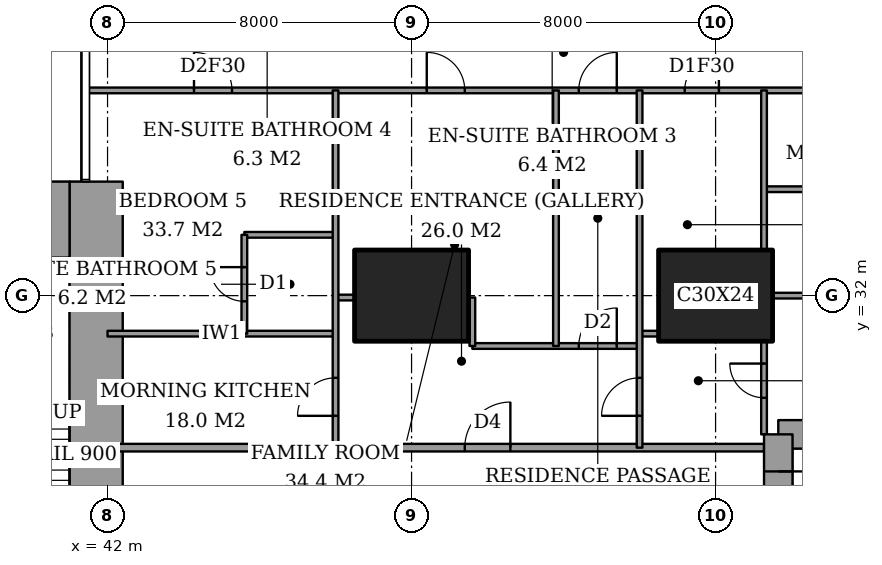
"""IFC4 building model, lengths in metres.
Left out: names, types, materials, properties, quantities, classifications, styles, units other than length and angle.
Written with IfcOpenShell. Run it as: python <this file> out.ifc"""

import sys

from ifc_helpers import new_model, si_unit, direction, frame, frame_2d, origin, origin_2d, place, context, subcontext, project, spatial, rectangle, extrude, element, fill, save


model = new_model("IFC4")
c1 = context("Model", 3, precision=1e-05, world=origin(), true_north=direction((0.0, 1.0)))
c2 = subcontext(c1, "Body", "Model", "MODEL_VIEW")
j1 = project(units=[si_unit("LENGTHUNIT", "METRE"), si_unit("PLANEANGLEUNIT", "RADIAN")], contexts=[c1])
p1 = place(None, origin())
s1 = spatial("IfcSite", under=j1, at=p1, CompositionType="ELEMENT")
p2 = place(p1, origin())
s2 = spatial("IfcBuilding", under=s1, at=p2, CompositionType="ELEMENT")
p3 = place(p2, frame((0.0, 0.0, 259.2)))
s3 = spatial("IfcBuildingStorey", under=s2, at=p3, CompositionType="ELEMENT", Elevation=259.2)
for number, where, z_axis, x_axis in (
    (1, (50.0, 32.0, 0.0), (0.0, 0.0, 1.0), (1.0, 0.0, 0.0)),
    (2, (58.0, 32.0, 0.0), (0.0, 0.0, 1.0), (1.0, 0.0, 0.0)),
):
    element("IfcColumn", number, at=place(p3, frame(where, z_axis=z_axis, x_axis=x_axis)), inside=s3, PredefinedType="COLUMN", context=c2, shape_type="SweptSolid", body=[
        extrude(rectangle(XDim=3.0, YDim=2.4, at=origin_2d()), origin(), (0.0, 0.0, 1.0), 3.6),
    ])
p4 = place(p3, frame((37.85, 34.0, 0.0), z_axis=(0.0, 0.0, 1.0), x_axis=(1.0, 0.0, 0.0)))
e3 = element("IfcWall", 3, at=p4, inside=s3, PredefinedType="SHEAR", context=c2, shape_type="SweptSolid", body=[
    extrude(rectangle(XDim=3.15, YDim=2.0, at=frame_2d((1.575, 0.0))), origin(), (0.0, 0.0, 1.0), 3.6),
])
p5 = place(p3, frame((41.7, 24.85, 0.0), z_axis=(0.0, 0.0, 1.0), x_axis=(0.0, 1.0, 0.0)))
e4 = element("IfcWall", 4, at=p5, inside=s3, PredefinedType="SHEAR", context=c2, shape_type="SweptSolid", body=[
    extrude(rectangle(XDim=10.15, YDim=1.4, at=frame_2d((5.075, 0.0))), origin(), (0.0, 0.0, 1.0), 3.6),
])
p6 = place(p3, frame((64.1, 28.35, 0.0), z_axis=(0.0, 0.0, 1.0), x_axis=(-1.0, 0.0, 0.0)))
e5 = element("IfcWall", 5, at=p6, inside=s3, PredefinedType="SHEAR", context=c2, shape_type="SweptSolid", body=[
    extrude(rectangle(XDim=4.45, YDim=0.75, at=frame_2d((2.225, 0.0))), origin(), (0.0, 0.0, 1.0), 3.6),
])
p7 = place(p3, frame((59.65, 28.35, 0.0), z_axis=(0.0, 0.0, 1.0), x_axis=(0.0, -1.0, 0.0)))
e6 = element("IfcWall", 6, at=p7, inside=s3, PredefinedType="SHEAR", context=c2, shape_type="SweptSolid", body=[
    extrude(rectangle(XDim=8.7, YDim=0.75, at=frame_2d((4.35, 0.0))), origin(), (0.0, 0.0, 1.0), 3.6),
])
p8 = place(p7, frame((0.975, 0.0, 0.0)))
e7 = element("IfcOpeningElement", 7, at=p8, cuts=e6, PredefinedType="OPENING", context=c2, shape_type="SweptSolid", body=[
    extrude(rectangle(XDim=1.0, YDim=2.1, at=frame_2d((0.5, 1.05))), frame((0.0, 0.385, 0.0), z_axis=(0.0, -1.0, 0.0), x_axis=(1.0, 0.0, 0.0)), (0.0, 0.0, 1.0), 0.77),
])
p9 = place(p3, frame((42.0, 28.0, 0.0), z_axis=(0.0, 0.0, 1.0), x_axis=(1.0, 0.0, 0.0)))
e8 = element("IfcWall", 8, at=p9, inside=s3, PredefinedType="PARTITIONING", context=c2, shape_type="SweptSolid", body=[
    extrude(rectangle(XDim=17.275, YDim=0.2, at=frame_2d((8.637, 0.0))), origin(), (0.0, 0.0, 1.0), 3.35),
])
p10 = place(p9, frame((9.4, 0.0, 0.0)))
e9 = element("IfcOpeningElement", 9, at=p10, cuts=e8, PredefinedType="OPENING", context=c2, shape_type="SweptSolid", body=[
    extrude(rectangle(XDim=1.2, YDim=2.4, at=frame_2d((0.6, 1.2))), frame((0.0, 0.11, 0.0), z_axis=(0.0, -1.0, 0.0), x_axis=(1.0, 0.0, 0.0)), (0.0, 0.0, 1.0), 0.22),
])
p11 = place(p3, frame((51.6, 30.675, 0.0), z_axis=(0.0, 0.0, 1.0), x_axis=(1.0, 0.0, 0.0)))
e10 = element("IfcWall", 10, at=p11, inside=s3, PredefinedType="PARTITIONING", context=c2, shape_type="SweptSolid", body=[
    extrude(rectangle(XDim=4.4, YDim=0.15, at=frame_2d((2.2, 0.0))), origin(), (0.0, 0.0, 1.0), 3.35),
])
p12 = place(p11, frame((2.8, 0.0, 0.0)))
e11 = element("IfcOpeningElement", 11, at=p12, cuts=e10, PredefinedType="OPENING", context=c2, shape_type="SweptSolid", body=[
    extrude(rectangle(XDim=1.0, YDim=2.1, at=frame_2d((0.5, 1.05))), frame((0.0, 0.085, 0.0), z_axis=(0.0, -1.0, 0.0), x_axis=(1.0, 0.0, 0.0)), (0.0, 0.0, 1.0), 0.17),
])
p13 = place(p3, frame((42.0, 31.0, 0.0), z_axis=(0.0, 0.0, 1.0), x_axis=(1.0, 0.0, 0.0)))
e12 = element("IfcWall", 12, at=p13, inside=s3, PredefinedType="PARTITIONING", context=c2, shape_type="SweptSolid", body=[
    extrude(rectangle(XDim=6.0, YDim=0.15, at=frame_2d((3.0, 0.0))), origin(), (0.0, 0.0, 1.0), 3.35),
])
p14 = place(p3, frame((56.0, 31.0, 0.0), z_axis=(0.0, 0.0, 1.0), x_axis=(1.0, 0.0, 0.0)))
e13 = element("IfcWall", 13, at=p14, inside=s3, PredefinedType="PARTITIONING", context=c2, shape_type="SweptSolid", body=[
    extrude(rectangle(XDim=0.5, YDim=0.15, at=frame_2d((0.25, 0.0))), origin(), (0.0, 0.0, 1.0), 3.35),
])
p15 = place(p3, frame((48.0, 31.95, 0.0), z_axis=(0.0, 0.0, 1.0), x_axis=(1.0, 0.0, 0.0)))
e14 = element("IfcWall", 14, at=p15, inside=s3, PredefinedType="PARTITIONING", context=c2, shape_type="SweptSolid", body=[
    extrude(rectangle(XDim=0.5, YDim=0.15, at=frame_2d((0.25, 0.0))), origin(), (0.0, 0.0, 1.0), 2.634),
])
p16 = place(p3, frame((59.5, 32.0, 0.0), z_axis=(0.0, 0.0, 1.0), x_axis=(1.0, 0.0, 0.0)))
e15 = element("IfcWall", 15, at=p16, inside=s3, PredefinedType="PARTITIONING", context=c2, shape_type="SweptSolid", body=[
    extrude(rectangle(XDim=5.35, YDim=0.15, at=frame_2d((2.675, 0.0))), origin(), (0.0, 0.0, 1.0), 2.634),
])
p17 = place(p3, frame((45.6, 33.6, 0.0), z_axis=(0.0, 0.0, 1.0), x_axis=(1.0, 0.0, 0.0)))
e16 = element("IfcWall", 16, at=p17, inside=s3, PredefinedType="PARTITIONING", context=c2, shape_type="SweptSolid", body=[
    extrude(rectangle(XDim=2.4, YDim=0.15, at=frame_2d((1.2, 0.0))), origin(), (0.0, 0.0, 1.0), 3.35),
])
p18 = place(p3, frame((59.275, 34.8, 0.0), z_axis=(0.0, 0.0, 1.0), x_axis=(1.0, 0.0, 0.0)))
e17 = element("IfcWall", 17, at=p18, inside=s3, PredefinedType="PARTITIONING", context=c2, shape_type="SweptSolid", body=[
    extrude(rectangle(XDim=2.6, YDim=0.15, at=frame_2d((1.3, 0.0))), origin(), (0.0, 0.0, 1.0), 3.35),
])
p19 = place(p3, frame((41.439, 37.4, 0.0), z_axis=(0.0, 0.0, 1.0), x_axis=(1.0, 0.0, 0.0)))
e18 = element("IfcWall", 18, at=p19, inside=s3, PredefinedType="PARTITIONING", context=c2, shape_type="SweptSolid", body=[
    extrude(rectangle(XDim=25.011, YDim=0.15, at=frame_2d((12.505, 0.0))), origin(), (0.0, 0.0, 1.0), 3.35),
])
p20 = place(p19, frame((12.961, 0.0, 0.0)))
e19 = element("IfcOpeningElement", 19, at=p20, cuts=e18, PredefinedType="OPENING", context=c2, shape_type="SweptSolid", body=[
    extrude(rectangle(XDim=1.0, YDim=2.1, at=frame_2d((0.5, 1.05))), frame((0.0, 0.085, 0.0), z_axis=(0.0, -1.0, 0.0), x_axis=(1.0, 0.0, 0.0)), (0.0, 0.0, 1.0), 0.17),
])
p21 = place(p19, frame((20.924, 0.0, 0.0)))
e20 = element("IfcOpeningElement", 20, at=p21, cuts=e18, PredefinedType="OPENING", context=c2, shape_type="SweptSolid", body=[
    extrude(rectangle(XDim=1.0, YDim=2.1, at=frame_2d((0.5, 1.05))), frame((0.0, 0.085, 0.0), z_axis=(0.0, -1.0, 0.0), x_axis=(1.0, 0.0, 0.0)), (0.0, 0.0, 1.0), 0.17),
])
p22 = place(p19, frame((15.749, 0.0, 0.0)))
e21 = element("IfcOpeningElement", 21, at=p22, cuts=e18, PredefinedType="OPENING", context=c2, shape_type="SweptSolid", body=[
    extrude(rectangle(XDim=0.9, YDim=2.1, at=frame_2d((0.45, 1.05))), frame((0.0, 0.085, 0.0), z_axis=(0.0, -1.0, 0.0), x_axis=(1.0, 0.0, 0.0)), (0.0, 0.0, 1.0), 0.17),
])
p23 = place(p19, frame((8.961, 0.0, 0.0)))
e22 = element("IfcOpeningElement", 22, at=p23, cuts=e18, PredefinedType="OPENING", context=c2, shape_type="SweptSolid", body=[
    extrude(rectangle(XDim=1.0, YDim=2.1, at=frame_2d((0.5, 1.05))), frame((0.0, 0.085, 0.0), z_axis=(0.0, -1.0, 0.0), x_axis=(1.0, 0.0, 0.0)), (0.0, 0.0, 1.0), 0.17),
])
p24 = place(p19, frame((2.836, 0.0, 0.0)))
e23 = element("IfcOpeningElement", 23, at=p24, cuts=e18, PredefinedType="OPENING", context=c2, shape_type="SweptSolid", body=[
    extrude(rectangle(XDim=1.0, YDim=2.1, at=frame_2d((0.5, 1.05))), frame((0.0, 0.085, 0.0), z_axis=(0.0, -1.0, 0.0), x_axis=(1.0, 0.0, 0.0)), (0.0, 0.0, 1.0), 0.17),
])
p25 = place(p3, frame((45.6, 31.0, 0.0), z_axis=(0.0, 0.0, 1.0), x_axis=(0.0, 1.0, 0.0)))
e24 = element("IfcWall", 24, at=p25, inside=s3, PredefinedType="PARTITIONING", context=c2, shape_type="SweptSolid", body=[
    extrude(rectangle(XDim=2.6, YDim=0.15, at=frame_2d((1.3, 0.0))), origin(), (0.0, 0.0, 1.0), 3.35),
])
p26 = place(p25, frame((0.85, 0.0, 0.0)))
e25 = element("IfcOpeningElement", 25, at=p26, cuts=e24, PredefinedType="OPENING", context=c2, shape_type="SweptSolid", body=[
    extrude(rectangle(XDim=0.9, YDim=2.1, at=frame_2d((0.45, 1.05))), frame((0.0, 0.085, 0.0), z_axis=(0.0, -1.0, 0.0), x_axis=(1.0, 0.0, 0.0)), (0.0, 0.0, 1.0), 0.17),
])
p27 = place(p3, frame((48.0, 28.0, 0.0), z_axis=(0.0, 0.0, 1.0), x_axis=(0.0, 1.0, 0.0)))
e26 = element("IfcWall", 26, at=p27, inside=s3, PredefinedType="PARTITIONING", context=c2, shape_type="SweptSolid", body=[
    extrude(rectangle(XDim=9.4, YDim=0.15, at=frame_2d((4.7, 0.0))), origin(), (0.0, 0.0, 1.0), 3.35),
])
p28 = place(p27, frame((0.837, 0.0, 0.0)))
e27 = element("IfcOpeningElement", 27, at=p28, cuts=e26, PredefinedType="OPENING", context=c2, shape_type="SweptSolid", body=[
    extrude(rectangle(XDim=1.0, YDim=2.1, at=frame_2d((0.5, 1.05))), frame((0.0, 0.085, 0.0), z_axis=(0.0, -1.0, 0.0), x_axis=(1.0, 0.0, 0.0)), (0.0, 0.0, 1.0), 0.17),
])
p29 = place(p3, frame((51.6, 30.675, 0.0), z_axis=(0.0, 0.0, 1.0), x_axis=(0.0, 1.0, 0.0)))
e28 = element("IfcWall", 28, at=p29, inside=s3, PredefinedType="PARTITIONING", context=c2, shape_type="SweptSolid", body=[
    extrude(rectangle(XDim=1.275, YDim=0.15, at=frame_2d((0.637, 0.0))), origin(), (0.0, 0.0, 1.0), 3.35),
])
p30 = place(p3, frame((53.8, 30.675, 0.0), z_axis=(0.0, 0.0, 1.0), x_axis=(0.0, 1.0, 0.0)))
e29 = element("IfcWall", 29, at=p30, inside=s3, PredefinedType="PARTITIONING", context=c2, shape_type="SweptSolid", body=[
    extrude(rectangle(XDim=6.725, YDim=0.15, at=frame_2d((3.362, 0.0))), origin(), (0.0, 0.0, 1.0), 3.35),
])
p31 = place(p3, frame((56.0, 28.0, 0.0), z_axis=(0.0, 0.0, 1.0), x_axis=(0.0, 1.0, 0.0)))
e30 = element("IfcWall", 30, at=p31, inside=s3, PredefinedType="PARTITIONING", context=c2, shape_type="SweptSolid", body=[
    extrude(rectangle(XDim=9.4, YDim=0.15, at=frame_2d((4.7, 0.0))), origin(), (0.0, 0.0, 1.0), 3.35),
])
p32 = place(p31, frame((0.837, 0.0, 0.0)))
e31 = element("IfcOpeningElement", 31, at=p32, cuts=e30, PredefinedType="OPENING", context=c2, shape_type="SweptSolid", body=[
    extrude(rectangle(XDim=1.0, YDim=2.1, at=frame_2d((0.5, 1.05))), frame((0.0, 0.085, 0.0), z_axis=(0.0, -1.0, 0.0), x_axis=(1.0, 0.0, 0.0)), (0.0, 0.0, 1.0), 0.17),
])
p33 = place(p3, frame((59.275, 28.35, 0.0), z_axis=(0.0, 0.0, 1.0), x_axis=(0.0, 1.0, 0.0)))
e32 = element("IfcWall", 32, at=p33, inside=s3, PredefinedType="PARTITIONING", context=c2, shape_type="SweptSolid", body=[
    extrude(rectangle(XDim=2.45, YDim=0.15, at=frame_2d((1.225, 0.0))), origin(), (0.0, 0.0, 1.0), 3.35),
])
p34 = place(p33, frame((0.962, 0.0, 0.0)))
e33 = element("IfcOpeningElement", 33, at=p34, cuts=e32, PredefinedType="OPENING", context=c2, shape_type="SweptSolid", body=[
    extrude(rectangle(XDim=0.9, YDim=2.1, at=frame_2d((0.45, 1.05))), frame((0.0, 0.085, 0.0), z_axis=(0.0, -1.0, 0.0), x_axis=(1.0, 0.0, 0.0)), (0.0, 0.0, 1.0), 0.17),
])
p35 = place(p3, frame((59.275, 33.2, 0.0), z_axis=(0.0, 0.0, 1.0), x_axis=(0.0, 1.0, 0.0)))
e34 = element("IfcWall", 34, at=p35, inside=s3, PredefinedType="PARTITIONING", context=c2, shape_type="SweptSolid", body=[
    extrude(rectangle(XDim=4.2, YDim=0.15, at=frame_2d((2.1, 0.0))), origin(), (0.0, 0.0, 1.0), 3.35),
])
p36 = place(p20, origin())
e35 = element("IfcDoor", 35, at=p36, inside=s3, OperationType="SINGLE_SWING_LEFT", PredefinedType="DOOR", context=c2, shape_type="SweptSolid", body=[
    extrude(rectangle(XDim=1.0, YDim=2.1, at=frame_2d((0.5, 1.05))), frame((0.0, 0.025, 0.0), z_axis=(0.0, -1.0, 0.0), x_axis=(1.0, 0.0, 0.0)), (0.0, 0.0, 1.0), 0.05),
])
fill(e19, e35)
p37 = place(p34, origin())
e36 = element("IfcDoor", 36, at=p37, inside=s3, OperationType="SINGLE_SWING_LEFT", PredefinedType="DOOR", context=c2, shape_type="SweptSolid", body=[
    extrude(rectangle(XDim=0.9, YDim=2.1, at=frame_2d((0.45, 1.05))), frame((0.0, 0.025, 0.0), z_axis=(0.0, -1.0, 0.0), x_axis=(1.0, 0.0, 0.0)), (0.0, 0.0, 1.0), 0.05),
])
fill(e33, e36)
p38 = place(p22, origin())
e37 = element("IfcDoor", 37, at=p38, inside=s3, OperationType="SINGLE_SWING_LEFT", PredefinedType="DOOR", context=c2, shape_type="SweptSolid", body=[
    extrude(rectangle(XDim=0.9, YDim=2.1, at=frame_2d((0.45, 1.05))), frame((0.0, 0.025, 0.0), z_axis=(0.0, -1.0, 0.0), x_axis=(1.0, 0.0, 0.0)), (0.0, 0.0, 1.0), 0.05),
])
fill(e21, e37)
p39 = place(p32, origin())
e38 = element("IfcDoor", 38, at=p39, inside=s3, OperationType="SINGLE_SWING_RIGHT", PredefinedType="DOOR", context=c2, shape_type="SweptSolid", body=[
    extrude(rectangle(XDim=1.0, YDim=2.1, at=frame_2d((0.5, 1.05))), frame((0.0, 0.025, 0.0), z_axis=(0.0, -1.0, 0.0), x_axis=(1.0, 0.0, 0.0)), (0.0, 0.0, 1.0), 0.05),
])
fill(e31, e38)
p40 = place(p10, origin())
e39 = element("IfcDoor", 39, at=p40, inside=s3, OperationType="SINGLE_SWING_LEFT", PredefinedType="DOOR", context=c2, shape_type="SweptSolid", body=[
    extrude(rectangle(XDim=1.2, YDim=2.4, at=frame_2d((0.6, 1.2))), frame((0.0, 0.025, 0.0), z_axis=(0.0, -1.0, 0.0), x_axis=(1.0, 0.0, 0.0)), (0.0, 0.0, 1.0), 0.05),
])
fill(e9, e39)
p41 = place(p12, origin())
e40 = element("IfcDoor", 40, at=p41, inside=s3, OperationType="SINGLE_SWING_LEFT", PredefinedType="DOOR", context=c2, shape_type="SweptSolid", body=[
    extrude(rectangle(XDim=1.0, YDim=2.1, at=frame_2d((0.5, 1.05))), frame((0.0, 0.025, 0.0), z_axis=(0.0, -1.0, 0.0), x_axis=(1.0, 0.0, 0.0)), (0.0, 0.0, 1.0), 0.05),
])
fill(e11, e40)
p42 = place(p23, origin())
e41 = element("IfcDoor", 41, at=p42, inside=s3, OperationType="SINGLE_SWING_RIGHT", PredefinedType="DOOR", context=c2, shape_type="SweptSolid", body=[
    extrude(rectangle(XDim=1.0, YDim=2.1, at=frame_2d((0.5, 1.05))), frame((0.0, 0.025, 0.0), z_axis=(0.0, -1.0, 0.0), x_axis=(1.0, 0.0, 0.0)), (0.0, 0.0, 1.0), 0.05),
])
fill(e22, e41)
p43 = place(p26, origin())
e42 = element("IfcDoor", 42, at=p43, inside=s3, OperationType="SINGLE_SWING_LEFT", PredefinedType="DOOR", context=c2, shape_type="SweptSolid", body=[
    extrude(rectangle(XDim=0.9, YDim=2.1, at=frame_2d((0.45, 1.05))), frame((0.0, 0.025, 0.0), z_axis=(0.0, -1.0, 0.0), x_axis=(1.0, 0.0, 0.0)), (0.0, 0.0, 1.0), 0.05),
])
fill(e25, e42)
p44 = place(p24, origin())
e43 = element("IfcDoor", 43, at=p44, inside=s3, OperationType="SINGLE_SWING_RIGHT", PredefinedType="DOOR", context=c2, shape_type="SweptSolid", body=[
    extrude(rectangle(XDim=1.0, YDim=2.1, at=frame_2d((0.5, 1.05))), frame((0.0, 0.025, 0.0), z_axis=(0.0, -1.0, 0.0), x_axis=(1.0, 0.0, 0.0)), (0.0, 0.0, 1.0), 0.05),
])
fill(e23, e43)
p45 = place(p28, origin())
e44 = element("IfcDoor", 44, at=p45, inside=s3, OperationType="SINGLE_SWING_RIGHT", PredefinedType="DOOR", context=c2, shape_type="SweptSolid", body=[
    extrude(rectangle(XDim=1.0, YDim=2.1, at=frame_2d((0.5, 1.05))), frame((0.0, 0.025, 0.0), z_axis=(0.0, -1.0, 0.0), x_axis=(1.0, 0.0, 0.0)), (0.0, 0.0, 1.0), 0.05),
])
fill(e27, e44)
p46 = place(p8, origin())
e45 = element("IfcDoor", 45, at=p46, inside=s3, OperationType="SINGLE_SWING_RIGHT", PredefinedType="DOOR", context=c2, shape_type="SweptSolid", body=[
    extrude(rectangle(XDim=1.0, YDim=2.1, at=frame_2d((0.5, 1.05))), frame((0.0, 0.025, 0.0), z_axis=(0.0, -1.0, 0.0), x_axis=(1.0, 0.0, 0.0)), (0.0, 0.0, 1.0), 0.05),
])
fill(e7, e45)
save(model, sys.argv[1])
